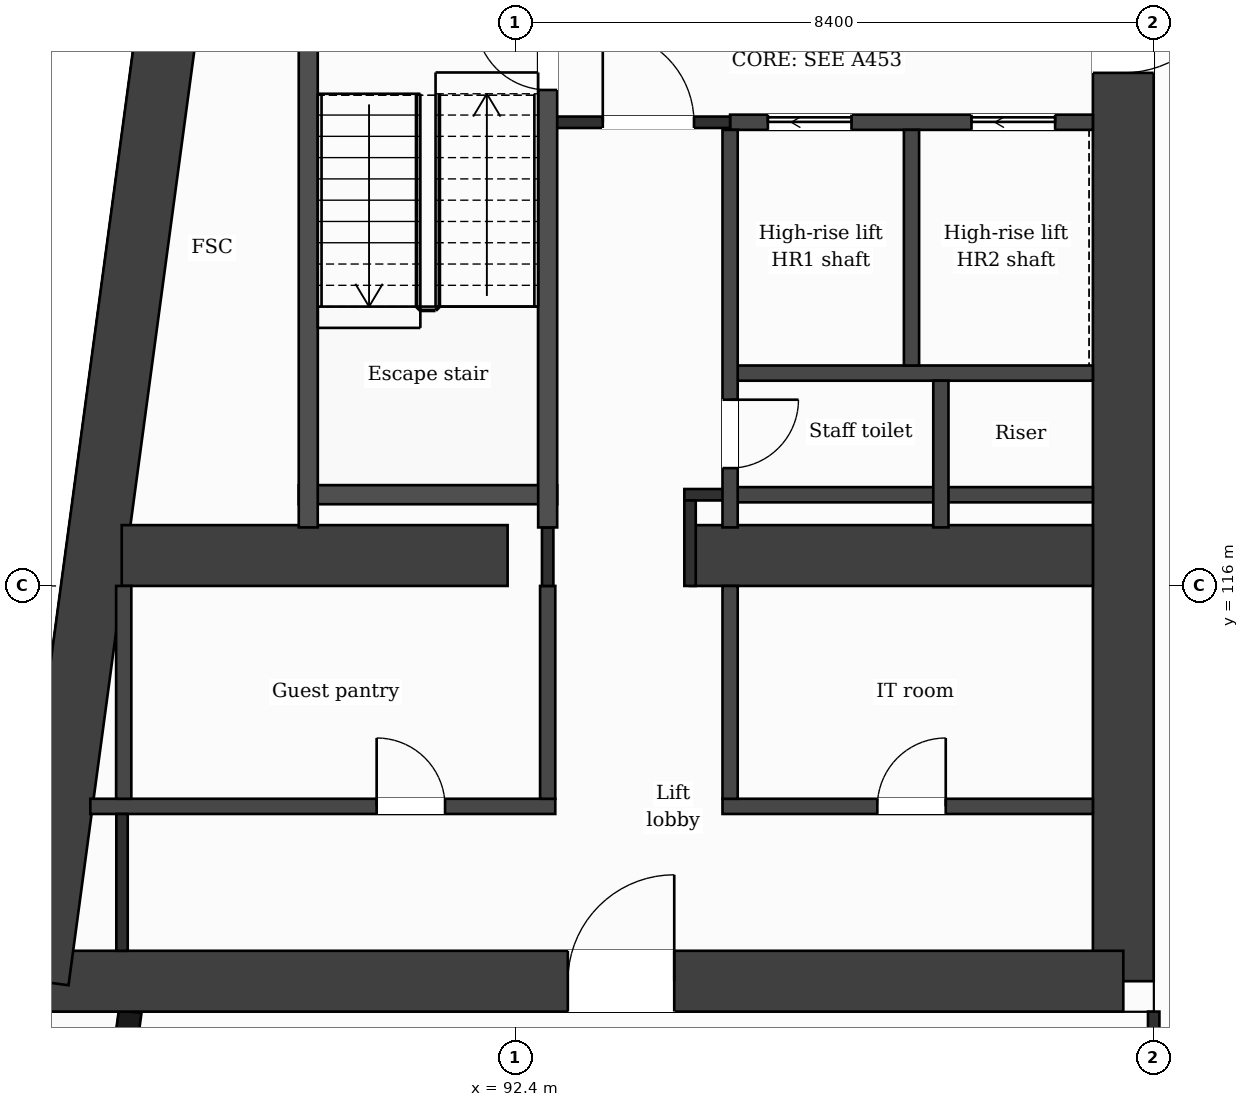
"""IFC4 building model, lengths in metres.
Left out: names, types, materials, properties, quantities, classifications, styles, units other than length and angle.
Written with IfcOpenShell. Run it as: python <this file> out.ifc"""

import sys

from ifc_helpers import new_model, si_unit, direction, frame, frame_2d, origin, place, context, subcontext, project, spatial, rectangle, extrude, element, fill, save


model = new_model("IFC4")
c1 = context("Model", 3, precision=1e-05, world=origin(), true_north=direction((0.0, 1.0)))
c2 = subcontext(c1, "Body", "Model", "MODEL_VIEW")
j1 = project(units=[si_unit("LENGTHUNIT", "METRE"), si_unit("PLANEANGLEUNIT", "RADIAN")], contexts=[c1])
p1 = place(None, origin())
s1 = spatial("IfcSite", under=j1, at=p1, CompositionType="ELEMENT")
p2 = place(p1, origin())
s2 = spatial("IfcBuilding", under=s1, at=p2, CompositionType="ELEMENT")
p3 = place(p2, frame((0.0, 0.0, 217.0)))
s3 = spatial("IfcBuildingStorey", under=s2, at=p3, CompositionType="ELEMENT", Elevation=217.0)
p4 = place(p3, frame((100.4, 132.0, 0.0), z_axis=(0.0, 0.0, 1.0), x_axis=(0.0, -1.0, 0.0)))
e1 = element("IfcWall", 1, at=p4, inside=s3, PredefinedType="SHEAR", context=c2, shape_type="SweptSolid", body=[
    extrude(rectangle(XDim=21.2, YDim=0.8, at=frame_2d((10.6, 0.0))), origin(), (0.0, 0.0, 1.0), 3.7),
])
p5 = place(p4, frame((7.85, 0.0, 0.0)))
e2 = element("IfcOpeningElement", 2, at=p5, cuts=e1, PredefinedType="OPENING", context=c2, shape_type="SweptSolid", body=[
    extrude(rectangle(XDim=1.4, YDim=2.1, at=frame_2d((0.7, 1.05))), frame((0.0, 0.41, 0.0), z_axis=(0.0, -1.0, 0.0), x_axis=(1.0, 0.0, 0.0)), (0.0, 0.0, 1.0), 0.82),
])
p6 = place(p3, frame((100.4, 110.8, 0.0), z_axis=(0.0, 0.0, 1.0), x_axis=(-1.0, 0.0, 0.0)))
e3 = element("IfcWall", 3, at=p6, inside=s3, PredefinedType="SHEAR", context=c2, shape_type="SweptSolid", body=[
    extrude(rectangle(XDim=14.273, YDim=0.8, at=frame_2d((7.137, 0.0))), origin(), (0.0, 0.0, 1.0), 3.7),
])
p7 = place(p6, frame((5.908, 0.0, 0.0)))
e4 = element("IfcOpeningElement", 4, at=p7, cuts=e3, PredefinedType="OPENING", context=c2, shape_type="SweptSolid", body=[
    extrude(rectangle(XDim=1.4, YDim=2.1, at=frame_2d((0.7, 1.05))), frame((0.0, 0.41, 0.0), z_axis=(0.0, -1.0, 0.0), x_axis=(1.0, 0.0, 0.0)), (0.0, 0.0, 1.0), 0.82),
])
p8 = place(p3, frame((86.127, 110.8, 0.0), z_axis=(0.0, 0.0, 1.0), x_axis=(0.133408347329, 0.991061154956, 0.0)))
e5 = element("IfcWall", 5, at=p8, inside=s3, PredefinedType="SHEAR", context=c2, shape_type="SweptSolid", body=[
    extrude(rectangle(XDim=21.391, YDim=0.8, at=frame_2d((10.696, 0.0))), origin(), (0.0, 0.0, 1.0), 3.7),
])
p9 = place(p3, frame((87.223, 116.4, 0.0), z_axis=(0.0, 0.0, 1.0), x_axis=(1.0, 0.0, 0.0)))
e6 = element("IfcWall", 6, at=p9, inside=s3, PredefinedType="SHEAR", context=c2, shape_type="SweptSolid", body=[
    extrude(rectangle(XDim=5.077, YDim=0.8, at=frame_2d((2.539, 0.0))), origin(), (0.0, 0.0, 1.0), 3.7),
])
p10 = place(p3, frame((94.7, 116.4, 0.0), z_axis=(0.0, 0.0, 1.0), x_axis=(1.0, 0.0, 0.0)))
e7 = element("IfcWall", 7, at=p10, inside=s3, PredefinedType="SHEAR", context=c2, shape_type="SweptSolid", body=[
    extrude(rectangle(XDim=5.3, YDim=0.8, at=frame_2d((2.65, 0.0))), origin(), (0.0, 0.0, 1.0), 3.7),
])
p11 = place(p3, frame((87.334, 110.4, 0.0), z_axis=(0.0, 0.0, 1.0), x_axis=(-0.133437175554, -0.991057273915, 0.0)))
e8 = element("IfcWall", 8, at=p11, inside=s3, PredefinedType="SOLIDWALL", context=c2, shape_type="SweptSolid", body=[
    extrude(rectangle(XDim=6.781, YDim=0.3, at=frame_2d((3.39, 0.0))), origin(), (0.0, 0.0, 1.0), 3.38),
])
p12 = place(p11, frame((1.418, 0.0, 0.0)))
e9 = element("IfcOpeningElement", 9, at=p12, cuts=e8, PredefinedType="OPENING", context=c2, shape_type="SweptSolid", body=[
    extrude(rectangle(XDim=1.2, YDim=2.4, at=frame_2d((0.6, 1.2))), frame((0.0, 0.16, 0.0), z_axis=(0.0, -1.0, 0.0), x_axis=(1.0, 0.0, 0.0)), (0.0, 0.0, 1.0), 0.32),
])
p13 = place(p11, frame((4.758, 0.0, 0.9)))
e10 = element("IfcOpeningElement", 10, at=p13, cuts=e8, PredefinedType="OPENING", context=c2, shape_type="SweptSolid", body=[
    extrude(rectangle(XDim=1.2, YDim=2.1, at=frame_2d((0.6, 1.05))), frame((0.0, 0.16, 0.0), z_axis=(0.0, -1.0, 0.0), x_axis=(1.0, 0.0, 0.0)), (0.0, 0.0, 1.0), 0.32),
])
p14 = place(p3, frame((86.81, 113.1, 0.0), z_axis=(0.0, 0.0, 1.0), x_axis=(1.0, 0.0, 0.0)))
e11 = element("IfcWall", 11, at=p14, inside=s3, PredefinedType="PARTITIONING", context=c2, shape_type="SweptSolid", body=[
    extrude(rectangle(XDim=6.117, YDim=0.2, at=frame_2d((3.059, 0.0))), origin(), (0.0, 0.0, 1.0), 3.38),
])
p15 = place(p14, frame((3.767, 0.0, 0.0)))
e12 = element("IfcOpeningElement", 12, at=p15, cuts=e11, PredefinedType="OPENING", context=c2, shape_type="SweptSolid", body=[
    extrude(rectangle(XDim=0.9, YDim=2.1, at=frame_2d((0.45, 1.05))), frame((0.0, 0.11, 0.0), z_axis=(0.0, -1.0, 0.0), x_axis=(1.0, 0.0, 0.0)), (0.0, 0.0, 1.0), 0.22),
])
p16 = place(p3, frame((95.127, 113.1, 0.0), z_axis=(0.0, 0.0, 1.0), x_axis=(1.0, 0.0, 0.0)))
e13 = element("IfcWall", 13, at=p16, inside=s3, PredefinedType="PARTITIONING", context=c2, shape_type="SweptSolid", body=[
    extrude(rectangle(XDim=4.873, YDim=0.2, at=frame_2d((2.437, 0.0))), origin(), (0.0, 0.0, 1.0), 3.38),
])
p17 = place(p16, frame((2.037, 0.0, 0.0)))
e14 = element("IfcOpeningElement", 14, at=p17, cuts=e13, PredefinedType="OPENING", context=c2, shape_type="SweptSolid", body=[
    extrude(rectangle(XDim=0.9, YDim=2.1, at=frame_2d((0.45, 1.05))), frame((0.0, 0.11, 0.0), z_axis=(0.0, -1.0, 0.0), x_axis=(1.0, 0.0, 0.0)), (0.0, 0.0, 1.0), 0.22),
])
p18 = place(p3, frame((95.227, 117.2, 0.0), z_axis=(0.0, 0.0, 1.0), x_axis=(1.0, 0.0, 0.0)))
e15 = element("IfcWall", 15, at=p18, inside=s3, PredefinedType="PARTITIONING", context=c2, shape_type="SweptSolid", body=[
    extrude(rectangle(XDim=4.773, YDim=0.2, at=frame_2d((2.386, 0.0))), origin(), (0.0, 0.0, 1.0), 3.38),
])
p19 = place(p3, frame((94.625, 117.2, 0.0), z_axis=(0.0, 0.0, 1.0), x_axis=(1.0, 0.0, 0.0)))
e16 = element("IfcWall", 16, at=p19, inside=s3, PredefinedType="PARTITIONING", context=c2, shape_type="SweptSolid", body=[
    extrude(rectangle(XDim=0.602, YDim=0.15, at=frame_2d((0.301, 0.0))), origin(), (0.0, 0.0, 1.0), 3.38),
])
p20 = place(p3, frame((89.552, 117.2, 0.0), z_axis=(0.0, 0.0, 1.0), x_axis=(1.0, 0.0, 0.0)))
e17 = element("IfcWall", 17, at=p20, inside=s3, PredefinedType="PARTITIONING", context=c2, shape_type="SweptSolid", body=[
    extrude(rectangle(XDim=3.4, YDim=0.25, at=frame_2d((1.7, 0.0))), origin(), (0.0, 0.0, 1.0), 3.38),
])
p21 = place(p3, frame((95.227, 118.8, 0.0), z_axis=(0.0, 0.0, 1.0), x_axis=(1.0, 0.0, 0.0)))
e18 = element("IfcWall", 18, at=p21, inside=s3, PredefinedType="PARTITIONING", context=c2, shape_type="SweptSolid", body=[
    extrude(rectangle(XDim=4.773, YDim=0.2, at=frame_2d((2.386, 0.0))), origin(), (0.0, 0.0, 1.0), 3.38),
])
p22 = place(p3, frame((95.227, 122.1, 0.0), z_axis=(0.0, 0.0, 1.0), x_axis=(1.0, 0.0, 0.0)))
e19 = element("IfcWall", 19, at=p22, inside=s3, PredefinedType="PARTITIONING", context=c2, shape_type="SweptSolid", body=[
    extrude(rectangle(XDim=4.773, YDim=0.2, at=frame_2d((2.386, 0.0))), origin(), (0.0, 0.0, 1.0), 3.38),
])
p23 = place(p22, frame((0.497, 0.0, 0.0)))
e20 = element("IfcOpeningElement", 20, at=p23, cuts=e19, PredefinedType="OPENING", context=c2, shape_type="SweptSolid", body=[
    extrude(rectangle(XDim=1.1, YDim=2.1, at=frame_2d((0.55, 1.05))), frame((0.0, 0.11, 0.0), z_axis=(0.0, -1.0, 0.0), x_axis=(1.0, 0.0, 0.0)), (0.0, 0.0, 1.0), 0.22),
])
p24 = place(p22, frame((3.176, 0.0, 0.0)))
e21 = element("IfcOpeningElement", 21, at=p24, cuts=e19, PredefinedType="OPENING", context=c2, shape_type="SweptSolid", body=[
    extrude(rectangle(XDim=1.1, YDim=2.1, at=frame_2d((0.55, 1.05))), frame((0.0, 0.11, 0.0), z_axis=(0.0, -1.0, 0.0), x_axis=(1.0, 0.0, 0.0)), (0.0, 0.0, 1.0), 0.22),
])
p25 = place(p3, frame((92.827, 122.1, 0.0), z_axis=(0.0, 0.0, 1.0), x_axis=(1.0, 0.0, 0.0)))
e22 = element("IfcWall", 22, at=p25, inside=s3, PredefinedType="PARTITIONING", context=c2, shape_type="SweptSolid", body=[
    extrude(rectangle(XDim=2.4, YDim=0.15, at=frame_2d((1.2, 0.0))), origin(), (0.0, 0.0, 1.0), 3.38),
])
p26 = place(p25, frame((0.725, 0.0, 0.0)))
e23 = element("IfcOpeningElement", 23, at=p26, cuts=e22, PredefinedType="OPENING", context=c2, shape_type="SweptSolid", body=[
    extrude(rectangle(XDim=1.2, YDim=2.1, at=frame_2d((0.6, 1.05))), frame((0.0, 0.085, 0.0), z_axis=(0.0, -1.0, 0.0), x_axis=(1.0, 0.0, 0.0)), (0.0, 0.0, 1.0), 0.17),
])
p27 = place(p3, frame((87.25, 113.2, 0.0), z_axis=(0.0, 0.0, 1.0), x_axis=(0.0, 1.0, 0.0)))
e24 = element("IfcWall", 24, at=p27, inside=s3, PredefinedType="PARTITIONING", context=c2, shape_type="SweptSolid", body=[
    extrude(rectangle(XDim=2.8, YDim=0.2, at=frame_2d((1.4, 0.0))), origin(), (0.0, 0.0, 1.0), 3.38),
])
p28 = place(p3, frame((87.227, 111.2, 0.0), z_axis=(0.0, 0.0, 1.0), x_axis=(0.0, 1.0, 0.0)))
e25 = element("IfcWall", 25, at=p28, inside=s3, PredefinedType="PARTITIONING", context=c2, shape_type="SweptSolid", body=[
    extrude(rectangle(XDim=1.8, YDim=0.15, at=frame_2d((0.9, 0.0))), origin(), (0.0, 0.0, 1.0), 3.38),
])
p29 = place(p3, frame((89.677, 116.77, 0.0), z_axis=(0.0, 0.0, 1.0), x_axis=(0.0, 1.0, 0.0)))
e26 = element("IfcWall", 26, at=p29, inside=s3, PredefinedType="PARTITIONING", context=c2, shape_type="SweptSolid", body=[
    extrude(rectangle(XDim=7.055, YDim=0.25, at=frame_2d((3.527, 0.0))), origin(), (0.0, 0.0, 1.0), 3.38),
])
p30 = place(p3, frame((92.827, 113.2, 0.0), z_axis=(0.0, 0.0, 1.0), x_axis=(0.0, 1.0, 0.0)))
e27 = element("IfcWall", 27, at=p30, inside=s3, PredefinedType="PARTITIONING", context=c2, shape_type="SweptSolid", body=[
    extrude(rectangle(XDim=2.8, YDim=0.2, at=frame_2d((1.4, 0.0))), origin(), (0.0, 0.0, 1.0), 3.38),
])
p31 = place(p3, frame((92.827, 116.0, 0.0), z_axis=(0.0, 0.0, 1.0), x_axis=(0.0, 1.0, 0.0)))
e28 = element("IfcWall", 28, at=p31, inside=s3, PredefinedType="PARTITIONING", context=c2, shape_type="SweptSolid", body=[
    extrude(rectangle(XDim=0.77, YDim=0.15, at=frame_2d((0.385, 0.0))), origin(), (0.0, 0.0, 1.0), 3.38),
])
p32 = place(p3, frame((92.827, 116.77, 0.0), z_axis=(0.0, 0.0, 1.0), x_axis=(0.0, 1.0, 0.0)))
e29 = element("IfcWall", 29, at=p32, inside=s3, PredefinedType="PARTITIONING", context=c2, shape_type="SweptSolid", body=[
    extrude(rectangle(XDim=7.055, YDim=0.25, at=frame_2d((3.527, 0.0))), origin(), (0.0, 0.0, 1.0), 3.38),
])
p33 = place(p32, frame((5.755, 0.0, 0.0)))
e30 = element("IfcOpeningElement", 30, at=p33, cuts=e29, PredefinedType="OPENING", context=c2, shape_type="SweptSolid", body=[
    extrude(rectangle(XDim=0.95, YDim=2.1, at=frame_2d((0.475, 1.05))), frame((0.0, 0.135, 0.0), z_axis=(0.0, -1.0, 0.0), x_axis=(1.0, 0.0, 0.0)), (0.0, 0.0, 1.0), 0.27),
])
p34 = place(p3, frame((94.7, 116.0, 0.0), z_axis=(0.0, 0.0, 1.0), x_axis=(0.0, 1.0, 0.0)))
e31 = element("IfcWall", 31, at=p34, inside=s3, PredefinedType="PARTITIONING", context=c2, shape_type="SweptSolid", body=[
    extrude(rectangle(XDim=1.125, YDim=0.15, at=frame_2d((0.562, 0.0))), origin(), (0.0, 0.0, 1.0), 3.38),
])
p35 = place(p3, frame((95.227, 113.2, 0.0), z_axis=(0.0, 0.0, 1.0), x_axis=(0.0, 1.0, 0.0)))
e32 = element("IfcWall", 32, at=p35, inside=s3, PredefinedType="PARTITIONING", context=c2, shape_type="SweptSolid", body=[
    extrude(rectangle(XDim=2.8, YDim=0.2, at=frame_2d((1.4, 0.0))), origin(), (0.0, 0.0, 1.0), 3.38),
])
p36 = place(p3, frame((95.227, 116.77, 0.0), z_axis=(0.0, 0.0, 1.0), x_axis=(0.0, 1.0, 0.0)))
e33 = element("IfcWall", 33, at=p36, inside=s3, PredefinedType="PARTITIONING", context=c2, shape_type="SweptSolid", body=[
    extrude(rectangle(XDim=5.23, YDim=0.2, at=frame_2d((2.615, 0.0))), origin(), (0.0, 0.0, 1.0), 3.38),
])
p37 = place(p36, frame((0.78, 0.0, 0.0)))
e34 = element("IfcOpeningElement", 34, at=p37, cuts=e33, PredefinedType="OPENING", context=c2, shape_type="SweptSolid", body=[
    extrude(rectangle(XDim=0.9, YDim=2.1, at=frame_2d((0.45, 1.05))), frame((0.0, 0.11, 0.0), z_axis=(0.0, -1.0, 0.0), x_axis=(1.0, 0.0, 0.0)), (0.0, 0.0, 1.0), 0.22),
])
p38 = place(p3, frame((97.614, 118.9, 0.0), z_axis=(0.0, 0.0, 1.0), x_axis=(0.0, 1.0, 0.0)))
e35 = element("IfcWall", 35, at=p38, inside=s3, PredefinedType="PARTITIONING", context=c2, shape_type="SweptSolid", body=[
    extrude(rectangle(XDim=3.1, YDim=0.2, at=frame_2d((1.55, 0.0))), origin(), (0.0, 0.0, 1.0), 3.38),
])
p39 = place(p3, frame((98.0, 116.77, 0.0), z_axis=(0.0, 0.0, 1.0), x_axis=(0.0, 1.0, 0.0)))
e36 = element("IfcWall", 36, at=p39, inside=s3, PredefinedType="PARTITIONING", context=c2, shape_type="SweptSolid", body=[
    extrude(rectangle(XDim=1.93, YDim=0.2, at=frame_2d((0.965, 0.0))), origin(), (0.0, 0.0, 1.0), 3.38),
])
p40 = place(p3, frame((100.8, 109.075, 0.0), z_axis=(0.0, 0.0, 1.0), x_axis=(0.0, 1.0, 0.0)))
e37 = element("IfcWall", 37, at=p40, inside=s3, PredefinedType="PARTITIONING", context=c2, shape_type="SweptSolid", body=[
    extrude(rectangle(XDim=1.325, YDim=0.15, at=frame_2d((0.663, 0.0))), origin(), (0.0, 0.0, 1.0), 3.38),
])
p41 = place(p26, origin())
e38 = element("IfcDoor", 38, at=p41, inside=s3, OperationType="SINGLE_SWING_LEFT", PredefinedType="DOOR", context=c2, shape_type="SweptSolid", body=[
    extrude(rectangle(XDim=1.2, YDim=2.1, at=frame_2d((0.6, 1.05))), frame((0.0, 0.025, 0.0), z_axis=(0.0, -1.0, 0.0), x_axis=(1.0, 0.0, 0.0)), (0.0, 0.0, 1.0), 0.05),
])
fill(e23, e38)
p42 = place(p23, origin())
e39 = element("IfcDoor", 39, at=p42, inside=s3, OperationType="SLIDING_TO_LEFT", PredefinedType="DOOR", context=c2, shape_type="SweptSolid", body=[
    extrude(rectangle(XDim=1.1, YDim=2.1, at=frame_2d((0.55, 1.05))), frame((0.0, 0.025, 0.0), z_axis=(0.0, -1.0, 0.0), x_axis=(1.0, 0.0, 0.0)), (0.0, 0.0, 1.0), 0.05),
])
fill(e20, e39)
p43 = place(p24, origin())
e40 = element("IfcDoor", 40, at=p43, inside=s3, OperationType="SLIDING_TO_LEFT", PredefinedType="DOOR", context=c2, shape_type="SweptSolid", body=[
    extrude(rectangle(XDim=1.1, YDim=2.1, at=frame_2d((0.55, 1.05))), frame((0.0, 0.025, 0.0), z_axis=(0.0, -1.0, 0.0), x_axis=(1.0, 0.0, 0.0)), (0.0, 0.0, 1.0), 0.05),
])
fill(e21, e40)
p44 = place(p33, origin())
e41 = element("IfcDoor", 41, at=p44, inside=s3, OperationType="SINGLE_SWING_RIGHT", PredefinedType="DOOR", context=c2, shape_type="SweptSolid", body=[
    extrude(rectangle(XDim=0.95, YDim=2.1, at=frame_2d((0.475, 1.05))), frame((0.0, 0.025, 0.0), z_axis=(0.0, -1.0, 0.0), x_axis=(1.0, 0.0, 0.0)), (0.0, 0.0, 1.0), 0.05),
])
fill(e30, e41)
p45 = place(p37, origin())
e42 = element("IfcDoor", 42, at=p45, inside=s3, OperationType="SINGLE_SWING_RIGHT", PredefinedType="DOOR", context=c2, shape_type="SweptSolid", body=[
    extrude(rectangle(XDim=0.9, YDim=2.1, at=frame_2d((0.45, 1.05))), frame((0.0, 0.025, 0.0), z_axis=(0.0, -1.0, 0.0), x_axis=(1.0, 0.0, 0.0)), (0.0, 0.0, 1.0), 0.05),
])
fill(e34, e42)
p46 = place(p15, origin())
e43 = element("IfcDoor", 43, at=p46, inside=s3, OperationType="SINGLE_SWING_LEFT", PredefinedType="DOOR", context=c2, shape_type="SweptSolid", body=[
    extrude(rectangle(XDim=0.9, YDim=2.1, at=frame_2d((0.45, 1.05))), frame((0.0, 0.025, 0.0), z_axis=(0.0, -1.0, 0.0), x_axis=(1.0, 0.0, 0.0)), (0.0, 0.0, 1.0), 0.05),
])
fill(e12, e43)
p47 = place(p17, origin())
e44 = element("IfcDoor", 44, at=p47, inside=s3, OperationType="SINGLE_SWING_RIGHT", PredefinedType="DOOR", context=c2, shape_type="SweptSolid", body=[
    extrude(rectangle(XDim=0.9, YDim=2.1, at=frame_2d((0.45, 1.05))), frame((0.0, 0.025, 0.0), z_axis=(0.0, -1.0, 0.0), x_axis=(1.0, 0.0, 0.0)), (0.0, 0.0, 1.0), 0.05),
])
fill(e14, e44)
p48 = place(p7, origin())
e45 = element("IfcDoor", 45, at=p48, inside=s3, OperationType="SINGLE_SWING_LEFT", PredefinedType="DOOR", context=c2, shape_type="SweptSolid", body=[
    extrude(rectangle(XDim=1.4, YDim=2.1, at=frame_2d((0.7, 1.05))), frame((0.0, 0.025, 0.0), z_axis=(0.0, -1.0, 0.0), x_axis=(1.0, 0.0, 0.0)), (0.0, 0.0, 1.0), 0.05),
])
fill(e4, e45)
p49 = place(p5, origin())
e46 = element("IfcDoor", 46, at=p49, inside=s3, OperationType="SINGLE_SWING_LEFT", PredefinedType="DOOR", context=c2, shape_type="SweptSolid", body=[
    extrude(rectangle(XDim=1.4, YDim=2.1, at=frame_2d((0.7, 1.05))), frame((0.0, 0.025, 0.0), z_axis=(0.0, -1.0, 0.0), x_axis=(1.0, 0.0, 0.0)), (0.0, 0.0, 1.0), 0.05),
])
fill(e2, e46)
save(model, sys.argv[1])
